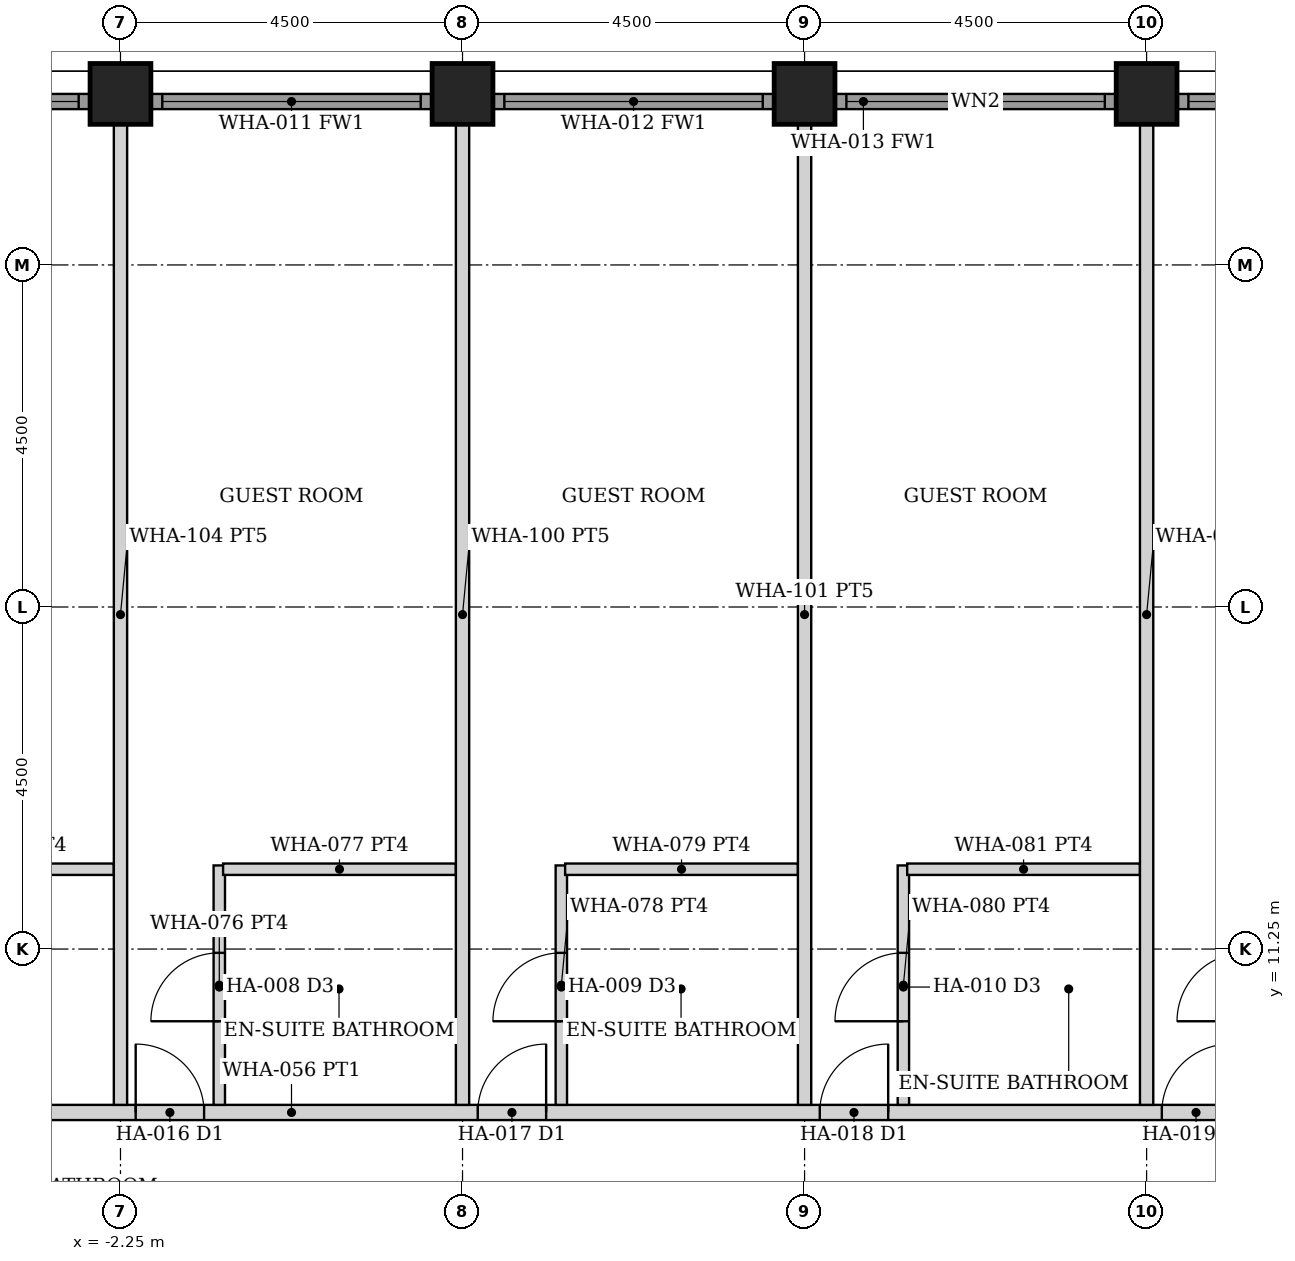
"""IFC4 building model, lengths in metres.
Left out: names, types, materials, properties, quantities, classifications, styles, units other than length and angle.
Written with IfcOpenShell. Run it as: python <this file> out.ifc"""

import sys

from ifc_helpers import new_model, si_unit, direction, frame, frame_2d, origin, origin_2d, place, context, subcontext, project, spatial, rectangle, hollow_rectangle, extrude, element, fill, save


model = new_model("IFC4")
c1 = context("Model", 3, precision=1e-05, world=origin(), true_north=direction((0.0, 1.0)))
c2 = subcontext(c1, "Body", "Model", "MODEL_VIEW")
j1 = project(units=[si_unit("LENGTHUNIT", "METRE"), si_unit("PLANEANGLEUNIT", "RADIAN")], contexts=[c1])
p1 = place(None, origin())
s1 = spatial("IfcSite", under=j1, at=p1, CompositionType="ELEMENT")
p2 = place(p1, origin())
s2 = spatial("IfcBuilding", under=s1, at=p2, CompositionType="ELEMENT")
p3 = place(p2, frame((0.0, 0.0, 118.4)))
s3 = spatial("IfcBuildingStorey", under=s2, at=p3, CompositionType="ELEMENT", Elevation=118.4)
for number, where, z_axis, x_axis in (
    (1, (-2.25, 22.5, 0.0), (0.0, 0.0, 1.0), (0.0, 1.0, 0.0)),
    (2, (2.25, 22.5, 0.0), (0.0, 0.0, 1.0), (0.0, 1.0, 0.0)),
    (3, (6.75, 22.5, 0.0), (0.0, 0.0, 1.0), (0.0, 1.0, 0.0)),
    (4, (11.25, 22.5, 0.0), (0.0, 0.0, 1.0), (0.0, 1.0, 0.0)),
):
    element("IfcColumn", number, at=place(p3, frame(where, z_axis=z_axis, x_axis=x_axis)), inside=s3, PredefinedType="COLUMN", context=c2, shape_type="SweptSolid", body=[
        extrude(hollow_rectangle(XDim=0.8, YDim=0.8, WallThickness=0.06, at=origin_2d()), origin(), (0.0, 0.0, 1.0), 3.6),
    ])
p4 = place(p3, frame((-6.345, 22.4, 0.0), z_axis=(0.0, 0.0, 1.0), x_axis=(1.0, 0.0, 0.0)))
e5 = element("IfcWall", 5, at=p4, inside=s3, PredefinedType="SOLIDWALL", context=c2, shape_type="SweptSolid", body=[
    extrude(rectangle(XDim=3.69, YDim=0.2, at=frame_2d((1.845, 0.0))), origin(), (0.0, 0.0, 1.0), 2.479),
])
p5 = place(p4, frame((0.145, 0.0, 0.3)))
e6 = element("IfcOpeningElement", 6, at=p5, cuts=e5, PredefinedType="OPENING", context=c2, shape_type="SweptSolid", body=[
    extrude(rectangle(XDim=3.4, YDim=2.029, at=frame_2d((1.7, 1.015))), frame((0.0, 0.11, 0.0), z_axis=(0.0, -1.0, 0.0), x_axis=(1.0, 0.0, 0.0)), (0.0, 0.0, 1.0), 0.22),
])
p6 = place(p3, frame((-1.845, 22.4, 0.0), z_axis=(0.0, 0.0, 1.0), x_axis=(1.0, 0.0, 0.0)))
e7 = element("IfcWall", 7, at=p6, inside=s3, PredefinedType="SOLIDWALL", context=c2, shape_type="SweptSolid", body=[
    extrude(rectangle(XDim=3.69, YDim=0.2, at=frame_2d((1.845, 0.0))), origin(), (0.0, 0.0, 1.0), 2.479),
])
p7 = place(p6, frame((0.145, 0.0, 0.3)))
e8 = element("IfcOpeningElement", 8, at=p7, cuts=e7, PredefinedType="OPENING", context=c2, shape_type="SweptSolid", body=[
    extrude(rectangle(XDim=3.4, YDim=2.029, at=frame_2d((1.7, 1.015))), frame((0.0, 0.11, 0.0), z_axis=(0.0, -1.0, 0.0), x_axis=(1.0, 0.0, 0.0)), (0.0, 0.0, 1.0), 0.22),
])
p8 = place(p3, frame((2.655, 22.4, 0.0), z_axis=(0.0, 0.0, 1.0), x_axis=(1.0, 0.0, 0.0)))
e9 = element("IfcWall", 9, at=p8, inside=s3, PredefinedType="SOLIDWALL", context=c2, shape_type="SweptSolid", body=[
    extrude(rectangle(XDim=3.69, YDim=0.2, at=frame_2d((1.845, 0.0))), origin(), (0.0, 0.0, 1.0), 2.479),
])
p9 = place(p8, frame((0.145, 0.0, 0.3)))
e10 = element("IfcOpeningElement", 10, at=p9, cuts=e9, PredefinedType="OPENING", context=c2, shape_type="SweptSolid", body=[
    extrude(rectangle(XDim=3.4, YDim=2.029, at=frame_2d((1.7, 1.015))), frame((0.0, 0.11, 0.0), z_axis=(0.0, -1.0, 0.0), x_axis=(1.0, 0.0, 0.0)), (0.0, 0.0, 1.0), 0.22),
])
p10 = place(p3, frame((7.155, 22.4, 0.0), z_axis=(0.0, 0.0, 1.0), x_axis=(1.0, 0.0, 0.0)))
e11 = element("IfcWall", 11, at=p10, inside=s3, PredefinedType="SOLIDWALL", context=c2, shape_type="SweptSolid", body=[
    extrude(rectangle(XDim=3.69, YDim=0.2, at=frame_2d((1.845, 0.0))), origin(), (0.0, 0.0, 1.0), 2.479),
])
p11 = place(p10, frame((0.145, 0.0, 0.3)))
e12 = element("IfcOpeningElement", 12, at=p11, cuts=e11, PredefinedType="OPENING", context=c2, shape_type="SweptSolid", body=[
    extrude(rectangle(XDim=3.4, YDim=2.029, at=frame_2d((1.7, 1.015))), frame((0.0, 0.11, 0.0), z_axis=(0.0, -1.0, 0.0), x_axis=(1.0, 0.0, 0.0)), (0.0, 0.0, 1.0), 0.22),
])
p12 = place(p3, frame((11.655, 22.4, 0.0), z_axis=(0.0, 0.0, 1.0), x_axis=(1.0, 0.0, 0.0)))
e13 = element("IfcWall", 13, at=p12, inside=s3, PredefinedType="SOLIDWALL", context=c2, shape_type="SweptSolid", body=[
    extrude(rectangle(XDim=3.69, YDim=0.2, at=frame_2d((1.845, 0.0))), origin(), (0.0, 0.0, 1.0), 2.479),
])
p13 = place(p12, frame((0.145, 0.0, 0.3)))
e14 = element("IfcOpeningElement", 14, at=p13, cuts=e13, PredefinedType="OPENING", context=c2, shape_type="SweptSolid", body=[
    extrude(rectangle(XDim=3.4, YDim=2.029, at=frame_2d((1.7, 1.015))), frame((0.0, 0.11, 0.0), z_axis=(0.0, -1.0, 0.0), x_axis=(1.0, 0.0, 0.0)), (0.0, 0.0, 1.0), 0.22),
])
p14 = place(p3, frame((-22.3, 9.1, 0.0), z_axis=(0.0, 0.0, 1.0), x_axis=(1.0, 0.0, 0.0)))
e15 = element("IfcWall", 15, at=p14, inside=s3, PredefinedType="PARTITIONING", context=c2, shape_type="SweptSolid", body=[
    extrude(rectangle(XDim=44.6, YDim=0.2, at=frame_2d((22.3, 0.0))), origin(), (0.0, 0.0, 1.0), 2.473),
])
p15 = place(p14, frame((6.75, 0.0, 0.0)))
e16 = element("IfcOpeningElement", 16, at=p15, cuts=e15, PredefinedType="OPENING", context=c2, shape_type="SweptSolid", body=[
    extrude(rectangle(XDim=0.9, YDim=2.1, at=frame_2d((0.45, 1.05))), frame((0.0, 0.11, 0.0), z_axis=(0.0, -1.0, 0.0), x_axis=(1.0, 0.0, 0.0)), (0.0, 0.0, 1.0), 0.22),
])
p16 = place(p14, frame((11.25, 0.0, 0.0)))
e17 = element("IfcOpeningElement", 17, at=p16, cuts=e15, PredefinedType="OPENING", context=c2, shape_type="SweptSolid", body=[
    extrude(rectangle(XDim=0.9, YDim=2.1, at=frame_2d((0.45, 1.05))), frame((0.0, 0.11, 0.0), z_axis=(0.0, -1.0, 0.0), x_axis=(1.0, 0.0, 0.0)), (0.0, 0.0, 1.0), 0.22),
])
p17 = place(p14, frame((15.75, 0.0, 0.0)))
e18 = element("IfcOpeningElement", 18, at=p17, cuts=e15, PredefinedType="OPENING", context=c2, shape_type="SweptSolid", body=[
    extrude(rectangle(XDim=0.9, YDim=2.1, at=frame_2d((0.45, 1.05))), frame((0.0, 0.11, 0.0), z_axis=(0.0, -1.0, 0.0), x_axis=(1.0, 0.0, 0.0)), (0.0, 0.0, 1.0), 0.22),
])
p18 = place(p14, frame((20.25, 0.0, 0.0)))
e19 = element("IfcOpeningElement", 19, at=p18, cuts=e15, PredefinedType="OPENING", context=c2, shape_type="SweptSolid", body=[
    extrude(rectangle(XDim=0.9, YDim=2.1, at=frame_2d((0.45, 1.05))), frame((0.0, 0.11, 0.0), z_axis=(0.0, -1.0, 0.0), x_axis=(1.0, 0.0, 0.0)), (0.0, 0.0, 1.0), 0.22),
])
p19 = place(p14, frame((24.75, 0.0, 0.0)))
e20 = element("IfcOpeningElement", 20, at=p19, cuts=e15, PredefinedType="OPENING", context=c2, shape_type="SweptSolid", body=[
    extrude(rectangle(XDim=0.9, YDim=2.1, at=frame_2d((0.45, 1.05))), frame((0.0, 0.11, 0.0), z_axis=(0.0, -1.0, 0.0), x_axis=(1.0, 0.0, 0.0)), (0.0, 0.0, 1.0), 0.22),
])
p20 = place(p14, frame((29.25, 0.0, 0.0)))
e21 = element("IfcOpeningElement", 21, at=p20, cuts=e15, PredefinedType="OPENING", context=c2, shape_type="SweptSolid", body=[
    extrude(rectangle(XDim=0.9, YDim=2.1, at=frame_2d((0.45, 1.05))), frame((0.0, 0.11, 0.0), z_axis=(0.0, -1.0, 0.0), x_axis=(1.0, 0.0, 0.0)), (0.0, 0.0, 1.0), 0.22),
])
p21 = place(p14, frame((33.75, 0.0, 0.0)))
e22 = element("IfcOpeningElement", 22, at=p21, cuts=e15, PredefinedType="OPENING", context=c2, shape_type="SweptSolid", body=[
    extrude(rectangle(XDim=0.9, YDim=2.1, at=frame_2d((0.45, 1.05))), frame((0.0, 0.11, 0.0), z_axis=(0.0, -1.0, 0.0), x_axis=(1.0, 0.0, 0.0)), (0.0, 0.0, 1.0), 0.22),
])
p22 = place(p14, frame((38.85, 0.0, 0.0)))
e23 = element("IfcOpeningElement", 23, at=p22, cuts=e15, PredefinedType="OPENING", context=c2, shape_type="SweptSolid", body=[
    extrude(rectangle(XDim=0.9, YDim=2.1, at=frame_2d((0.45, 1.05))), frame((0.0, 0.11, 0.0), z_axis=(0.0, -1.0, 0.0), x_axis=(1.0, 0.0, 0.0)), (0.0, 0.0, 1.0), 0.22),
])
p23 = place(p14, frame((4.85, 0.0, 0.0)))
e24 = element("IfcOpeningElement", 24, at=p23, cuts=e15, PredefinedType="OPENING", context=c2, shape_type="SweptSolid", body=[
    extrude(rectangle(XDim=0.9, YDim=2.1, at=frame_2d((0.45, 1.05))), frame((0.0, 0.11, 0.0), z_axis=(0.0, -1.0, 0.0), x_axis=(1.0, 0.0, 0.0)), (0.0, 0.0, 1.0), 0.22),
])
p24 = place(p3, frame((-5.4, 12.3, 0.0), z_axis=(0.0, 0.0, 1.0), x_axis=(1.0, 0.0, 0.0)))
e25 = element("IfcWall", 25, at=p24, inside=s3, PredefinedType="PARTITIONING", context=c2, shape_type="SweptSolid", body=[
    extrude(rectangle(XDim=3.062, YDim=0.15, at=frame_2d((1.531, 0.0))), origin(), (0.0, 0.0, 1.0), 2.473),
])
p25 = place(p3, frame((-0.95, 9.2, 0.0), z_axis=(0.0, 0.0, 1.0), x_axis=(0.0, 1.0, 0.0)))
e26 = element("IfcWall", 26, at=p25, inside=s3, PredefinedType="PARTITIONING", context=c2, shape_type="SweptSolid", body=[
    extrude(rectangle(XDim=3.15, YDim=0.15, at=frame_2d((1.575, 0.0))), origin(), (0.0, 0.0, 1.0), 2.473),
])
p26 = place(p25, frame((1.1, 0.0, 0.0)))
e27 = element("IfcOpeningElement", 27, at=p26, cuts=e26, PredefinedType="OPENING", context=c2, shape_type="SweptSolid", body=[
    extrude(rectangle(XDim=0.9, YDim=2.1, at=frame_2d((0.45, 1.05))), frame((0.0, 0.085, 0.0), z_axis=(0.0, -1.0, 0.0), x_axis=(1.0, 0.0, 0.0)), (0.0, 0.0, 1.0), 0.17),
])
p27 = place(p3, frame((-0.9, 12.3, 0.0), z_axis=(0.0, 0.0, 1.0), x_axis=(1.0, 0.0, 0.0)))
e28 = element("IfcWall", 28, at=p27, inside=s3, PredefinedType="PARTITIONING", context=c2, shape_type="SweptSolid", body=[
    extrude(rectangle(XDim=3.062, YDim=0.15, at=frame_2d((1.531, 0.0))), origin(), (0.0, 0.0, 1.0), 2.473),
])
p28 = place(p3, frame((3.55, 9.2, 0.0), z_axis=(0.0, 0.0, 1.0), x_axis=(0.0, 1.0, 0.0)))
e29 = element("IfcWall", 29, at=p28, inside=s3, PredefinedType="PARTITIONING", context=c2, shape_type="SweptSolid", body=[
    extrude(rectangle(XDim=3.15, YDim=0.15, at=frame_2d((1.575, 0.0))), origin(), (0.0, 0.0, 1.0), 2.473),
])
p29 = place(p28, frame((1.1, 0.0, 0.0)))
e30 = element("IfcOpeningElement", 30, at=p29, cuts=e29, PredefinedType="OPENING", context=c2, shape_type="SweptSolid", body=[
    extrude(rectangle(XDim=0.9, YDim=2.1, at=frame_2d((0.45, 1.05))), frame((0.0, 0.085, 0.0), z_axis=(0.0, -1.0, 0.0), x_axis=(1.0, 0.0, 0.0)), (0.0, 0.0, 1.0), 0.17),
])
p30 = place(p3, frame((3.6, 12.3, 0.0), z_axis=(0.0, 0.0, 1.0), x_axis=(1.0, 0.0, 0.0)))
e31 = element("IfcWall", 31, at=p30, inside=s3, PredefinedType="PARTITIONING", context=c2, shape_type="SweptSolid", body=[
    extrude(rectangle(XDim=3.062, YDim=0.15, at=frame_2d((1.531, 0.0))), origin(), (0.0, 0.0, 1.0), 2.473),
])
p31 = place(p3, frame((8.05, 9.2, 0.0), z_axis=(0.0, 0.0, 1.0), x_axis=(0.0, 1.0, 0.0)))
e32 = element("IfcWall", 32, at=p31, inside=s3, PredefinedType="PARTITIONING", context=c2, shape_type="SweptSolid", body=[
    extrude(rectangle(XDim=3.15, YDim=0.15, at=frame_2d((1.575, 0.0))), origin(), (0.0, 0.0, 1.0), 2.473),
])
p32 = place(p31, frame((1.1, 0.0, 0.0)))
e33 = element("IfcOpeningElement", 33, at=p32, cuts=e32, PredefinedType="OPENING", context=c2, shape_type="SweptSolid", body=[
    extrude(rectangle(XDim=0.9, YDim=2.1, at=frame_2d((0.45, 1.05))), frame((0.0, 0.085, 0.0), z_axis=(0.0, -1.0, 0.0), x_axis=(1.0, 0.0, 0.0)), (0.0, 0.0, 1.0), 0.17),
])
p33 = place(p3, frame((8.1, 12.3, 0.0), z_axis=(0.0, 0.0, 1.0), x_axis=(1.0, 0.0, 0.0)))
e34 = element("IfcWall", 34, at=p33, inside=s3, PredefinedType="PARTITIONING", context=c2, shape_type="SweptSolid", body=[
    extrude(rectangle(XDim=3.062, YDim=0.15, at=frame_2d((1.531, 0.0))), origin(), (0.0, 0.0, 1.0), 2.473),
])
for number, where, z_axis, x_axis in (
    (35, (-2.25, 9.2, 0.0), (0.0, 0.0, 1.0), (0.0, 1.0, 0.0)),
    (36, (2.25, 9.2, 0.0), (0.0, 0.0, 1.0), (0.0, 1.0, 0.0)),
    (37, (6.75, 9.2, 0.0), (0.0, 0.0, 1.0), (0.0, 1.0, 0.0)),
    (38, (11.25, 9.2, 0.0), (0.0, 0.0, 1.0), (0.0, 1.0, 0.0)),
):
    element("IfcWall", number, at=place(p3, frame(where, z_axis=z_axis, x_axis=x_axis)), inside=s3, PredefinedType="PARTITIONING", context=c2, shape_type="SweptSolid", body=[
        extrude(rectangle(XDim=12.9, YDim=0.175, at=frame_2d((6.45, 0.0))), origin(), (0.0, 0.0, 1.0), 2.473),
    ])
p34 = place(p5, origin())
e39 = element("IfcWindow", 39, at=p34, inside=s3, PartitioningType="SINGLE_PANEL", PredefinedType="WINDOW", context=c2, shape_type="SweptSolid", body=[
    extrude(rectangle(XDim=3.4, YDim=2.029, at=frame_2d((1.7, 1.015))), frame((0.0, 0.03, 0.0), z_axis=(0.0, -1.0, 0.0), x_axis=(1.0, 0.0, 0.0)), (0.0, 0.0, 1.0), 0.06),
])
fill(e6, e39)
p35 = place(p7, origin())
e40 = element("IfcWindow", 40, at=p35, inside=s3, PartitioningType="SINGLE_PANEL", PredefinedType="WINDOW", context=c2, shape_type="SweptSolid", body=[
    extrude(rectangle(XDim=3.4, YDim=2.029, at=frame_2d((1.7, 1.015))), frame((0.0, 0.03, 0.0), z_axis=(0.0, -1.0, 0.0), x_axis=(1.0, 0.0, 0.0)), (0.0, 0.0, 1.0), 0.06),
])
fill(e8, e40)
p36 = place(p9, origin())
e41 = element("IfcWindow", 41, at=p36, inside=s3, PartitioningType="SINGLE_PANEL", PredefinedType="WINDOW", context=c2, shape_type="SweptSolid", body=[
    extrude(rectangle(XDim=3.4, YDim=2.029, at=frame_2d((1.7, 1.015))), frame((0.0, 0.03, 0.0), z_axis=(0.0, -1.0, 0.0), x_axis=(1.0, 0.0, 0.0)), (0.0, 0.0, 1.0), 0.06),
])
fill(e10, e41)
p37 = place(p11, origin())
e42 = element("IfcWindow", 42, at=p37, inside=s3, PartitioningType="SINGLE_PANEL", PredefinedType="WINDOW", context=c2, shape_type="SweptSolid", body=[
    extrude(rectangle(XDim=3.4, YDim=2.029, at=frame_2d((1.7, 1.015))), frame((0.0, 0.03, 0.0), z_axis=(0.0, -1.0, 0.0), x_axis=(1.0, 0.0, 0.0)), (0.0, 0.0, 1.0), 0.06),
])
fill(e12, e42)
p38 = place(p13, origin())
e43 = element("IfcWindow", 43, at=p38, inside=s3, PartitioningType="SINGLE_PANEL", PredefinedType="WINDOW", context=c2, shape_type="SweptSolid", body=[
    extrude(rectangle(XDim=3.4, YDim=2.029, at=frame_2d((1.7, 1.015))), frame((0.0, 0.03, 0.0), z_axis=(0.0, -1.0, 0.0), x_axis=(1.0, 0.0, 0.0)), (0.0, 0.0, 1.0), 0.06),
])
fill(e14, e43)
p39 = place(p18, origin())
e44 = element("IfcDoor", 44, at=p39, inside=s3, OperationType="SINGLE_SWING_LEFT", PredefinedType="DOOR", context=c2, shape_type="SweptSolid", body=[
    extrude(rectangle(XDim=0.9, YDim=2.1, at=frame_2d((0.45, 1.05))), frame((0.0, 0.025, 0.0), z_axis=(0.0, -1.0, 0.0), x_axis=(1.0, 0.0, 0.0)), (0.0, 0.0, 1.0), 0.05),
])
fill(e19, e44)
p40 = place(p26, origin())
e45 = element("IfcDoor", 45, at=p40, inside=s3, OperationType="SINGLE_SWING_LEFT", PredefinedType="DOOR", context=c2, shape_type="SweptSolid", body=[
    extrude(rectangle(XDim=0.9, YDim=2.1, at=frame_2d((0.45, 1.05))), frame((0.0, 0.025, 0.0), z_axis=(0.0, -1.0, 0.0), x_axis=(1.0, 0.0, 0.0)), (0.0, 0.0, 1.0), 0.05),
])
fill(e27, e45)
p41 = place(p19, origin())
e46 = element("IfcDoor", 46, at=p41, inside=s3, OperationType="SINGLE_SWING_RIGHT", PredefinedType="DOOR", context=c2, shape_type="SweptSolid", body=[
    extrude(rectangle(XDim=0.9, YDim=2.1, at=frame_2d((0.45, 1.05))), frame((0.0, 0.025, 0.0), z_axis=(0.0, -1.0, 0.0), x_axis=(1.0, 0.0, 0.0)), (0.0, 0.0, 1.0), 0.05),
])
fill(e20, e46)
p42 = place(p29, origin())
e47 = element("IfcDoor", 47, at=p42, inside=s3, OperationType="SINGLE_SWING_LEFT", PredefinedType="DOOR", context=c2, shape_type="SweptSolid", body=[
    extrude(rectangle(XDim=0.9, YDim=2.1, at=frame_2d((0.45, 1.05))), frame((0.0, 0.025, 0.0), z_axis=(0.0, -1.0, 0.0), x_axis=(1.0, 0.0, 0.0)), (0.0, 0.0, 1.0), 0.05),
])
fill(e30, e47)
p43 = place(p20, origin())
e48 = element("IfcDoor", 48, at=p43, inside=s3, OperationType="SINGLE_SWING_RIGHT", PredefinedType="DOOR", context=c2, shape_type="SweptSolid", body=[
    extrude(rectangle(XDim=0.9, YDim=2.1, at=frame_2d((0.45, 1.05))), frame((0.0, 0.025, 0.0), z_axis=(0.0, -1.0, 0.0), x_axis=(1.0, 0.0, 0.0)), (0.0, 0.0, 1.0), 0.05),
])
fill(e21, e48)
p44 = place(p32, origin())
e49 = element("IfcDoor", 49, at=p44, inside=s3, OperationType="SINGLE_SWING_LEFT", PredefinedType="DOOR", context=c2, shape_type="SweptSolid", body=[
    extrude(rectangle(XDim=0.9, YDim=2.1, at=frame_2d((0.45, 1.05))), frame((0.0, 0.025, 0.0), z_axis=(0.0, -1.0, 0.0), x_axis=(1.0, 0.0, 0.0)), (0.0, 0.0, 1.0), 0.05),
])
fill(e33, e49)
p45 = place(p21, origin())
e50 = element("IfcDoor", 50, at=p45, inside=s3, OperationType="SINGLE_SWING_RIGHT", PredefinedType="DOOR", context=c2, shape_type="SweptSolid", body=[
    extrude(rectangle(XDim=0.9, YDim=2.1, at=frame_2d((0.45, 1.05))), frame((0.0, 0.025, 0.0), z_axis=(0.0, -1.0, 0.0), x_axis=(1.0, 0.0, 0.0)), (0.0, 0.0, 1.0), 0.05),
])
fill(e22, e50)
save(model, sys.argv[1])
